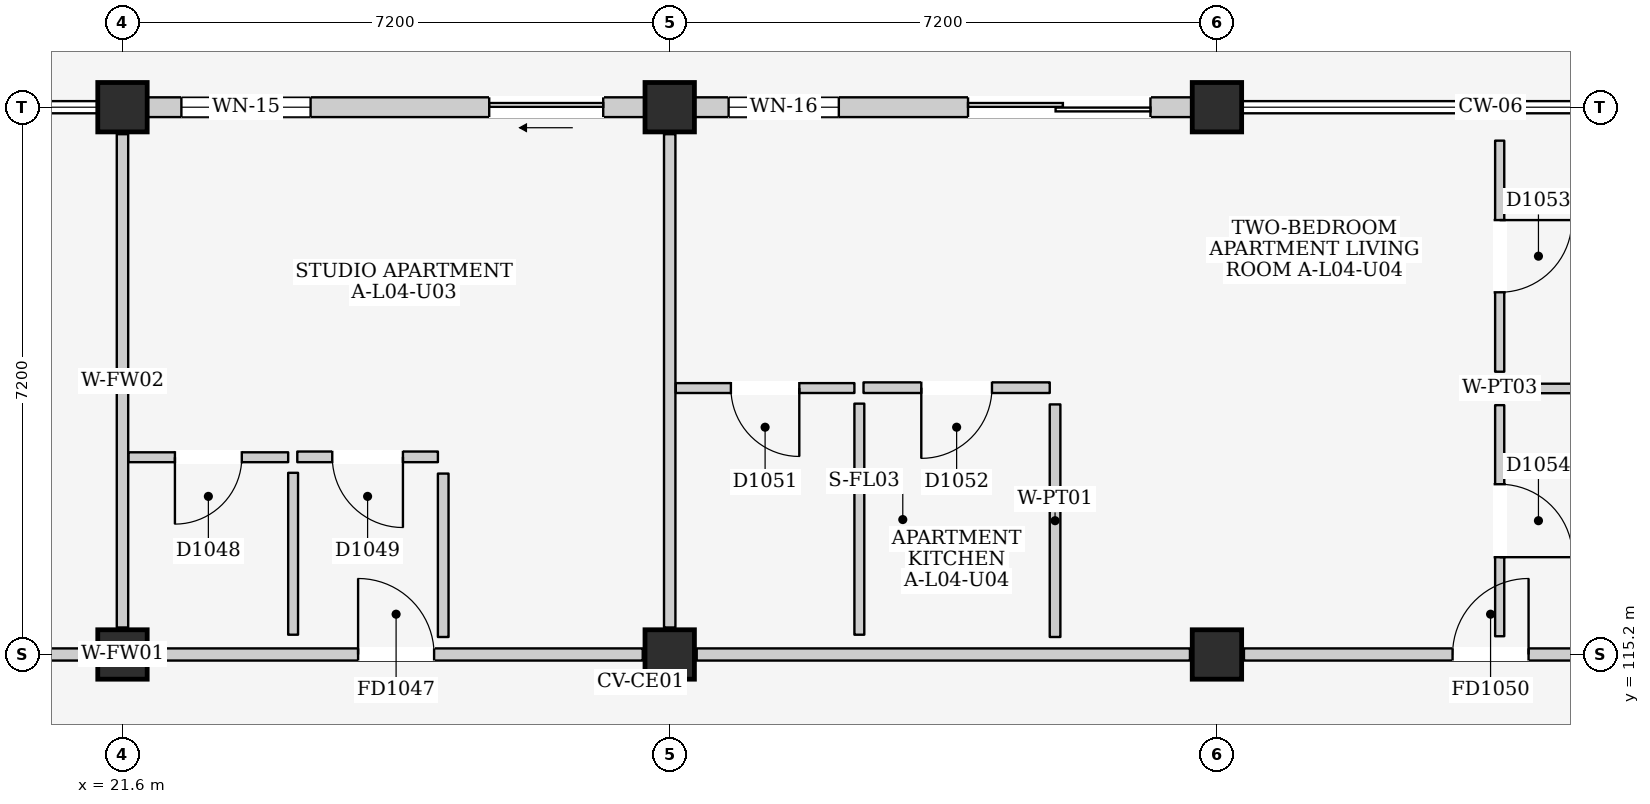
"""IFC4 building model, lengths in metres.
Left out: names, types, materials, properties, quantities, classifications, styles, units other than length and angle.
Written with IfcOpenShell. Run it as: python <this file> out.ifc"""

import sys

from ifc_helpers import new_model, si_unit, direction, frame, frame_2d, origin, origin_2d, place, context, subcontext, project, spatial, rectangle, extrude, element, fill, save


model = new_model("IFC4")
c1 = context("Model", 3, precision=1e-05, world=origin(), true_north=direction((0.0, 1.0)))
c2 = subcontext(c1, "Body", "Model", "MODEL_VIEW")
j1 = project(units=[si_unit("LENGTHUNIT", "METRE"), si_unit("PLANEANGLEUNIT", "RADIAN")], contexts=[c1])
p1 = place(None, origin())
s1 = spatial("IfcSite", under=j1, at=p1, CompositionType="ELEMENT")
p2 = place(p1, origin())
s2 = spatial("IfcBuilding", under=s1, at=p2, CompositionType="ELEMENT")
p3 = place(p2, frame((0.0, 0.0, 15.4)))
s3 = spatial("IfcBuildingStorey", under=s2, at=p3, CompositionType="ELEMENT", Elevation=15.4)
for number, where, z_axis, x_axis in (
    (1, (21.6, 115.2, 0.0), (0.0, 0.0, 1.0), (1.0, 0.0, 0.0)),
    (2, (21.6, 122.4, 0.0), (0.0, 0.0, 1.0), (1.0, 0.0, 0.0)),
    (3, (28.8, 115.2, 0.0), (0.0, 0.0, 1.0), (1.0, 0.0, 0.0)),
    (4, (28.8, 122.4, 0.0), (0.0, 0.0, 1.0), (1.0, 0.0, 0.0)),
    (5, (36.0, 115.2, 0.0), (0.0, 0.0, 1.0), (1.0, 0.0, 0.0)),
    (6, (36.0, 122.4, 0.0), (0.0, 0.0, 1.0), (1.0, 0.0, 0.0)),
):
    element("IfcColumn", number, at=place(p3, frame(where, z_axis=z_axis, x_axis=x_axis)), inside=s3, PredefinedType="COLUMN", context=c2, shape_type="SweptSolid", body=[
        extrude(rectangle(XDim=0.65, YDim=0.65, at=origin_2d()), origin(), (0.0, 0.0, 1.0), 3.2),
    ])
p4 = place(p3, frame((21.925, 122.4, 0.0), z_axis=(0.0, 0.0, 1.0), x_axis=(1.0, 0.0, 0.0)))
e7 = element("IfcWall", 7, at=p4, inside=s3, PredefinedType="ELEMENTEDWALL", context=c2, shape_type="SweptSolid", body=[
    extrude(rectangle(XDim=6.55, YDim=0.26, at=frame_2d((3.275, 0.0))), origin(), (0.0, 0.0, 1.0), 2.43),
])
p5 = place(p4, frame((4.5, 0.0, 0.0)))
e8 = element("IfcOpeningElement", 8, at=p5, cuts=e7, PredefinedType="OPENING", context=c2, shape_type="SweptSolid", body=[
    extrude(rectangle(XDim=1.5, YDim=2.12, at=frame_2d((0.75, 1.06))), frame((0.0, 0.145, 0.0), z_axis=(0.0, -1.0, 0.0), x_axis=(1.0, 0.0, 0.0)), (0.0, 0.0, 1.0), 0.29),
])
p6 = place(p4, frame((0.45, 0.0, 0.86)))
e9 = element("IfcOpeningElement", 9, at=p6, cuts=e7, PredefinedType="OPENING", context=c2, shape_type="SweptSolid", body=[
    extrude(rectangle(XDim=1.7, YDim=1.45, at=frame_2d((0.85, 0.725))), frame((0.0, 0.145, 0.0), z_axis=(0.0, -1.0, 0.0), x_axis=(1.0, 0.0, 0.0)), (0.0, 0.0, 1.0), 0.29),
])
p7 = place(p3, frame((29.125, 122.4, 0.0), z_axis=(0.0, 0.0, 1.0), x_axis=(1.0, 0.0, 0.0)))
e10 = element("IfcWall", 10, at=p7, inside=s3, PredefinedType="ELEMENTEDWALL", context=c2, shape_type="SweptSolid", body=[
    extrude(rectangle(XDim=6.55, YDim=0.26, at=frame_2d((3.275, 0.0))), origin(), (0.0, 0.0, 1.0), 2.43),
])
p8 = place(p7, frame((3.6, 0.0, 0.0)))
e11 = element("IfcOpeningElement", 11, at=p8, cuts=e10, PredefinedType="OPENING", context=c2, shape_type="SweptSolid", body=[
    extrude(rectangle(XDim=2.4, YDim=2.12, at=frame_2d((1.2, 1.06))), frame((0.0, 0.145, 0.0), z_axis=(0.0, -1.0, 0.0), x_axis=(1.0, 0.0, 0.0)), (0.0, 0.0, 1.0), 0.29),
])
p9 = place(p7, frame((0.45, 0.0, 0.9)))
e12 = element("IfcOpeningElement", 12, at=p9, cuts=e10, PredefinedType="OPENING", context=c2, shape_type="SweptSolid", body=[
    extrude(rectangle(XDim=1.45, YDim=1.4, at=frame_2d((0.725, 0.7))), frame((0.0, 0.145, 0.0), z_axis=(0.0, -1.0, 0.0), x_axis=(1.0, 0.0, 0.0)), (0.0, 0.0, 1.0), 0.29),
])
p10 = place(p3, frame((14.755, 115.2, 0.0), z_axis=(0.0, 0.0, 1.0), x_axis=(1.0, 0.0, 0.0)))
e13 = element("IfcWall", 13, at=p10, inside=s3, PredefinedType="PARTITIONING", context=c2, shape_type="SweptSolid", body=[
    extrude(rectangle(XDim=6.49, YDim=0.16, at=frame_2d((3.245, 0.0))), origin(), (0.0, 0.0, 1.0), 2.285),
])
p11 = place(p10, frame((2.72, 0.0, 0.0)))
e14 = element("IfcOpeningElement", 14, at=p11, cuts=e13, PredefinedType="OPENING", context=c2, shape_type="SweptSolid", body=[
    extrude(rectangle(XDim=1.05, YDim=2.15, at=frame_2d((0.525, 1.075))), frame((0.0, 0.095, 0.0), z_axis=(0.0, -1.0, 0.0), x_axis=(1.0, 0.0, 0.0)), (0.0, 0.0, 1.0), 0.19),
])
p12 = place(p3, frame((21.6, 115.555, 0.0), z_axis=(0.0, 0.0, 1.0), x_axis=(0.0, 1.0, 0.0)))
e15 = element("IfcWall", 15, at=p12, inside=s3, PredefinedType="PARTITIONING", context=c2, shape_type="SweptSolid", body=[
    extrude(rectangle(XDim=6.49, YDim=0.15, at=frame_2d((3.245, 0.0))), origin(), (0.0, 0.0, 1.0), 2.385),
])
p13 = place(p3, frame((21.955, 115.2, 0.0), z_axis=(0.0, 0.0, 1.0), x_axis=(1.0, 0.0, 0.0)))
e16 = element("IfcWall", 16, at=p13, inside=s3, PredefinedType="PARTITIONING", context=c2, shape_type="SweptSolid", body=[
    extrude(rectangle(XDim=6.49, YDim=0.16, at=frame_2d((3.245, 0.0))), origin(), (0.0, 0.0, 1.0), 2.285),
])
p14 = place(p13, frame((2.745, 0.0, 0.0)))
e17 = element("IfcOpeningElement", 17, at=p14, cuts=e16, PredefinedType="OPENING", context=c2, shape_type="SweptSolid", body=[
    extrude(rectangle(XDim=1.0, YDim=2.15, at=frame_2d((0.5, 1.075))), frame((0.0, 0.095, 0.0), z_axis=(0.0, -1.0, 0.0), x_axis=(1.0, 0.0, 0.0)), (0.0, 0.0, 1.0), 0.19),
])
p15 = place(p3, frame((28.8, 115.555, 0.0), z_axis=(0.0, 0.0, 1.0), x_axis=(0.0, 1.0, 0.0)))
e18 = element("IfcWall", 18, at=p15, inside=s3, PredefinedType="PARTITIONING", context=c2, shape_type="SweptSolid", body=[
    extrude(rectangle(XDim=6.49, YDim=0.15, at=frame_2d((3.245, 0.0))), origin(), (0.0, 0.0, 1.0), 2.385),
])
p16 = place(p3, frame((21.68, 117.795, 0.0), z_axis=(0.0, 0.0, 1.0), x_axis=(1.0, 0.0, 0.0)))
e19 = element("IfcWall", 19, at=p16, inside=s3, PredefinedType="PARTITIONING", context=c2, shape_type="SweptSolid", body=[
    extrude(rectangle(XDim=2.1, YDim=0.13, at=frame_2d((1.05, 0.0))), origin(), (0.0, 0.0, 1.0), 2.95),
])
p17 = place(p16, frame((0.61, 0.0, 0.0)))
e20 = element("IfcOpeningElement", 20, at=p17, cuts=e19, PredefinedType="OPENING", context=c2, shape_type="SweptSolid", body=[
    extrude(rectangle(XDim=0.88, YDim=2.1, at=frame_2d((0.44, 1.05))), frame((0.0, 0.08, 0.0), z_axis=(0.0, -1.0, 0.0), x_axis=(1.0, 0.0, 0.0)), (0.0, 0.0, 1.0), 0.16),
])
p18 = place(p3, frame((23.845, 115.46, 0.0), z_axis=(0.0, 0.0, 1.0), x_axis=(0.0, 1.0, 0.0)))
e21 = element("IfcWall", 21, at=p18, inside=s3, PredefinedType="PARTITIONING", context=c2, shape_type="SweptSolid", body=[
    extrude(rectangle(XDim=2.13, YDim=0.13, at=frame_2d((1.065, 0.0))), origin(), (0.0, 0.0, 1.0), 2.95),
])
p19 = place(p3, frame((23.9, 117.8, 0.0), z_axis=(0.0, 0.0, 1.0), x_axis=(1.0, 0.0, 0.0)))
e22 = element("IfcWall", 22, at=p19, inside=s3, PredefinedType="PARTITIONING", context=c2, shape_type="SweptSolid", body=[
    extrude(rectangle(XDim=1.85, YDim=0.14, at=frame_2d((0.925, 0.0))), origin(), (0.0, 0.0, 1.0), 2.95),
])
p20 = place(p19, frame((0.46, 0.0, 0.0)))
e23 = element("IfcOpeningElement", 23, at=p20, cuts=e22, PredefinedType="OPENING", context=c2, shape_type="SweptSolid", body=[
    extrude(rectangle(XDim=0.93, YDim=2.14, at=frame_2d((0.465, 1.07))), frame((0.0, 0.085, 0.0), z_axis=(0.0, -1.0, 0.0), x_axis=(1.0, 0.0, 0.0)), (0.0, 0.0, 1.0), 0.17),
])
p21 = place(p3, frame((25.82, 115.43, 0.0), z_axis=(0.0, 0.0, 1.0), x_axis=(0.0, 1.0, 0.0)))
e24 = element("IfcWall", 24, at=p21, inside=s3, PredefinedType="PARTITIONING", context=c2, shape_type="SweptSolid", body=[
    extrude(rectangle(XDim=2.15, YDim=0.14, at=frame_2d((1.075, 0.0))), origin(), (0.0, 0.0, 1.0), 2.95),
])
p22 = place(p3, frame((29.155, 115.2, 0.0), z_axis=(0.0, 0.0, 1.0), x_axis=(1.0, 0.0, 0.0)))
e25 = element("IfcWall", 25, at=p22, inside=s3, PredefinedType="PARTITIONING", context=c2, shape_type="SweptSolid", body=[
    extrude(rectangle(XDim=6.49, YDim=0.16, at=frame_2d((3.245, 0.0))), origin(), (0.0, 0.0, 1.0), 2.285),
])
p23 = place(p3, frame((36.355, 115.2, 0.0), z_axis=(0.0, 0.0, 1.0), x_axis=(1.0, 0.0, 0.0)))
e26 = element("IfcWall", 26, at=p23, inside=s3, PredefinedType="PARTITIONING", context=c2, shape_type="SweptSolid", body=[
    extrude(rectangle(XDim=6.49, YDim=0.16, at=frame_2d((3.245, 0.0))), origin(), (0.0, 0.0, 1.0), 2.285),
])
p24 = place(p23, frame((2.745, 0.0, 0.0)))
e27 = element("IfcOpeningElement", 27, at=p24, cuts=e26, PredefinedType="OPENING", context=c2, shape_type="SweptSolid", body=[
    extrude(rectangle(XDim=1.0, YDim=2.15, at=frame_2d((0.5, 1.075))), frame((0.0, 0.095, 0.0), z_axis=(0.0, -1.0, 0.0), x_axis=(1.0, 0.0, 0.0)), (0.0, 0.0, 1.0), 0.19),
])
p25 = place(p3, frame((28.88, 118.705, 0.0), z_axis=(0.0, 0.0, 1.0), x_axis=(1.0, 0.0, 0.0)))
e28 = element("IfcWall", 28, at=p25, inside=s3, PredefinedType="PARTITIONING", context=c2, shape_type="SweptSolid", body=[
    extrude(rectangle(XDim=2.35, YDim=0.13, at=frame_2d((1.175, 0.0))), origin(), (0.0, 0.0, 1.0), 2.95),
])
p26 = place(p25, frame((0.725, 0.0, 0.0)))
e29 = element("IfcOpeningElement", 29, at=p26, cuts=e28, PredefinedType="OPENING", context=c2, shape_type="SweptSolid", body=[
    extrude(rectangle(XDim=0.9, YDim=2.1, at=frame_2d((0.45, 1.05))), frame((0.0, 0.08, 0.0), z_axis=(0.0, -1.0, 0.0), x_axis=(1.0, 0.0, 0.0)), (0.0, 0.0, 1.0), 0.16),
])
p27 = place(p3, frame((31.295, 115.46, 0.0), z_axis=(0.0, 0.0, 1.0), x_axis=(0.0, 1.0, 0.0)))
e30 = element("IfcWall", 30, at=p27, inside=s3, PredefinedType="PARTITIONING", context=c2, shape_type="SweptSolid", body=[
    extrude(rectangle(XDim=3.04, YDim=0.13, at=frame_2d((1.52, 0.0))), origin(), (0.0, 0.0, 1.0), 2.95),
])
p28 = place(p3, frame((31.35, 118.71, 0.0), z_axis=(0.0, 0.0, 1.0), x_axis=(1.0, 0.0, 0.0)))
e31 = element("IfcWall", 31, at=p28, inside=s3, PredefinedType="PARTITIONING", context=c2, shape_type="SweptSolid", body=[
    extrude(rectangle(XDim=2.45, YDim=0.14, at=frame_2d((1.225, 0.0))), origin(), (0.0, 0.0, 1.0), 2.95),
])
p29 = place(p28, frame((0.76, 0.0, 0.0)))
e32 = element("IfcOpeningElement", 32, at=p29, cuts=e31, PredefinedType="OPENING", context=c2, shape_type="SweptSolid", body=[
    extrude(rectangle(XDim=0.93, YDim=2.14, at=frame_2d((0.465, 1.07))), frame((0.0, 0.085, 0.0), z_axis=(0.0, -1.0, 0.0), x_axis=(1.0, 0.0, 0.0)), (0.0, 0.0, 1.0), 0.17),
])
p30 = place(p3, frame((33.87, 115.43, 0.0), z_axis=(0.0, 0.0, 1.0), x_axis=(0.0, 1.0, 0.0)))
e33 = element("IfcWall", 33, at=p30, inside=s3, PredefinedType="PARTITIONING", context=c2, shape_type="SweptSolid", body=[
    extrude(rectangle(XDim=3.06, YDim=0.14, at=frame_2d((1.53, 0.0))), origin(), (0.0, 0.0, 1.0), 2.95),
])
p31 = place(p3, frame((39.72, 118.92, 0.0), z_axis=(0.0, 0.0, 1.0), x_axis=(0.0, 1.0, 0.0)))
e34 = element("IfcWall", 34, at=p31, inside=s3, PredefinedType="PARTITIONING", context=c2, shape_type="SweptSolid", body=[
    extrude(rectangle(XDim=3.04, YDim=0.12, at=frame_2d((1.52, 0.0))), origin(), (0.0, 0.0, 1.0), 2.95),
])
p32 = place(p31, frame((1.045, 0.0, 0.0)))
e35 = element("IfcOpeningElement", 35, at=p32, cuts=e34, PredefinedType="OPENING", context=c2, shape_type="SweptSolid", body=[
    extrude(rectangle(XDim=0.95, YDim=2.15, at=frame_2d((0.475, 1.075))), frame((0.0, 0.075, 0.0), z_axis=(0.0, -1.0, 0.0), x_axis=(1.0, 0.0, 0.0)), (0.0, 0.0, 1.0), 0.15),
])
p33 = place(p3, frame((39.92, 118.7, 0.0), z_axis=(0.0, 0.0, 1.0), x_axis=(1.0, 0.0, 0.0)))
e36 = element("IfcWall", 36, at=p33, inside=s3, PredefinedType="PARTITIONING", context=c2, shape_type="SweptSolid", body=[
    extrude(rectangle(XDim=3.06, YDim=0.125, at=frame_2d((1.53, 0.0))), origin(), (0.0, 0.0, 1.0), 2.95),
])
p34 = place(p3, frame((39.72, 115.44, 0.0), z_axis=(0.0, 0.0, 1.0), x_axis=(0.0, 1.0, 0.0)))
e37 = element("IfcWall", 37, at=p34, inside=s3, PredefinedType="PARTITIONING", context=c2, shape_type="SweptSolid", body=[
    extrude(rectangle(XDim=3.04, YDim=0.12, at=frame_2d((1.52, 0.0))), origin(), (0.0, 0.0, 1.0), 2.95),
])
p35 = place(p34, frame((1.04, 0.0, 0.0)))
e38 = element("IfcOpeningElement", 38, at=p35, cuts=e37, PredefinedType="OPENING", context=c2, shape_type="SweptSolid", body=[
    extrude(rectangle(XDim=0.96, YDim=2.15, at=frame_2d((0.48, 1.075))), frame((0.0, 0.075, 0.0), z_axis=(0.0, -1.0, 0.0), x_axis=(1.0, 0.0, 0.0)), (0.0, 0.0, 1.0), 0.15),
])
p36 = place(p5, frame((1.5, 0.0, 0.0), z_axis=(0.0, 0.0, 1.0), x_axis=(-1.0, 0.0, 0.0)))
e39 = element("IfcDoor", 39, at=p36, inside=s3, OperationType="SLIDING_TO_LEFT", PredefinedType="DOOR", context=c2, shape_type="SweptSolid", body=[
    extrude(rectangle(XDim=1.5, YDim=2.12, at=frame_2d((0.75, 1.06))), frame((0.0, 0.025, 0.0), z_axis=(0.0, -1.0, 0.0), x_axis=(1.0, 0.0, 0.0)), (0.0, 0.0, 1.0), 0.05),
])
fill(e8, e39)
p37 = place(p6, origin())
e40 = element("IfcWindow", 40, at=p37, inside=s3, PartitioningType="DOUBLE_PANEL_VERTICAL", PredefinedType="WINDOW", context=c2, shape_type="SweptSolid", body=[
    extrude(rectangle(XDim=1.7, YDim=1.45, at=frame_2d((0.85, 0.725))), frame((0.0, 0.03, 0.0), z_axis=(0.0, -1.0, 0.0), x_axis=(1.0, 0.0, 0.0)), (0.0, 0.0, 1.0), 0.06),
])
fill(e9, e40)
p38 = place(p8, frame((2.4, 0.0, 0.0), z_axis=(0.0, 0.0, 1.0), x_axis=(-1.0, 0.0, 0.0)))
e41 = element("IfcDoor", 41, at=p38, inside=s3, OperationType="DOUBLE_DOOR_SLIDING", PredefinedType="DOOR", context=c2, shape_type="SweptSolid", body=[
    extrude(rectangle(XDim=2.4, YDim=2.12, at=frame_2d((1.2, 1.06))), frame((0.0, 0.025, 0.0), z_axis=(0.0, -1.0, 0.0), x_axis=(1.0, 0.0, 0.0)), (0.0, 0.0, 1.0), 0.05),
])
fill(e11, e41)
p39 = place(p9, origin())
e42 = element("IfcWindow", 42, at=p39, inside=s3, PartitioningType="DOUBLE_PANEL_VERTICAL", PredefinedType="WINDOW", context=c2, shape_type="SweptSolid", body=[
    extrude(rectangle(XDim=1.45, YDim=1.4, at=frame_2d((0.725, 0.7))), frame((0.0, 0.03, 0.0), z_axis=(0.0, -1.0, 0.0), x_axis=(1.0, 0.0, 0.0)), (0.0, 0.0, 1.0), 0.06),
])
fill(e12, e42)
p40 = place(p14, origin())
e43 = element("IfcDoor", 43, at=p40, inside=s3, OperationType="SINGLE_SWING_LEFT", PredefinedType="DOOR", context=c2, shape_type="SweptSolid", body=[
    extrude(rectangle(XDim=1.0, YDim=2.15, at=frame_2d((0.5, 1.075))), frame((0.0, 0.025, 0.0), z_axis=(0.0, -1.0, 0.0), x_axis=(1.0, 0.0, 0.0)), (0.0, 0.0, 1.0), 0.05),
])
fill(e17, e43)
p41 = place(p17, frame((0.88, 0.0, 0.0), z_axis=(0.0, 0.0, 1.0), x_axis=(-1.0, 0.0, 0.0)))
e44 = element("IfcDoor", 44, at=p41, inside=s3, OperationType="SINGLE_SWING_RIGHT", PredefinedType="DOOR", context=c2, shape_type="SweptSolid", body=[
    extrude(rectangle(XDim=0.88, YDim=2.1, at=frame_2d((0.44, 1.05))), frame((0.0, 0.025, 0.0), z_axis=(0.0, -1.0, 0.0), x_axis=(1.0, 0.0, 0.0)), (0.0, 0.0, 1.0), 0.05),
])
fill(e20, e44)
p42 = place(p20, frame((0.93, 0.0, 0.0), z_axis=(0.0, 0.0, 1.0), x_axis=(-1.0, 0.0, 0.0)))
e45 = element("IfcDoor", 45, at=p42, inside=s3, OperationType="SINGLE_SWING_LEFT", PredefinedType="DOOR", context=c2, shape_type="SweptSolid", body=[
    extrude(rectangle(XDim=0.93, YDim=2.14, at=frame_2d((0.465, 1.07))), frame((0.0, 0.025, 0.0), z_axis=(0.0, -1.0, 0.0), x_axis=(1.0, 0.0, 0.0)), (0.0, 0.0, 1.0), 0.05),
])
fill(e23, e45)
p43 = place(p24, origin())
e46 = element("IfcDoor", 46, at=p43, inside=s3, OperationType="SINGLE_SWING_RIGHT", PredefinedType="DOOR", context=c2, shape_type="SweptSolid", body=[
    extrude(rectangle(XDim=1.0, YDim=2.15, at=frame_2d((0.5, 1.075))), frame((0.0, 0.025, 0.0), z_axis=(0.0, -1.0, 0.0), x_axis=(1.0, 0.0, 0.0)), (0.0, 0.0, 1.0), 0.05),
])
fill(e27, e46)
p44 = place(p26, frame((0.9, 0.0, 0.0), z_axis=(0.0, 0.0, 1.0), x_axis=(-1.0, 0.0, 0.0)))
e47 = element("IfcDoor", 47, at=p44, inside=s3, OperationType="SINGLE_SWING_LEFT", PredefinedType="DOOR", context=c2, shape_type="SweptSolid", body=[
    extrude(rectangle(XDim=0.9, YDim=2.1, at=frame_2d((0.45, 1.05))), frame((0.0, 0.025, 0.0), z_axis=(0.0, -1.0, 0.0), x_axis=(1.0, 0.0, 0.0)), (0.0, 0.0, 1.0), 0.05),
])
fill(e29, e47)
p45 = place(p29, frame((0.93, 0.0, 0.0), z_axis=(0.0, 0.0, 1.0), x_axis=(-1.0, 0.0, 0.0)))
e48 = element("IfcDoor", 48, at=p45, inside=s3, OperationType="SINGLE_SWING_RIGHT", PredefinedType="DOOR", context=c2, shape_type="SweptSolid", body=[
    extrude(rectangle(XDim=0.93, YDim=2.14, at=frame_2d((0.465, 1.07))), frame((0.0, 0.025, 0.0), z_axis=(0.0, -1.0, 0.0), x_axis=(1.0, 0.0, 0.0)), (0.0, 0.0, 1.0), 0.05),
])
fill(e32, e48)
p46 = place(p32, frame((0.95, 0.0, 0.0), z_axis=(0.0, 0.0, 1.0), x_axis=(-1.0, 0.0, 0.0)))
e49 = element("IfcDoor", 49, at=p46, inside=s3, OperationType="SINGLE_SWING_LEFT", PredefinedType="DOOR", context=c2, shape_type="SweptSolid", body=[
    extrude(rectangle(XDim=0.95, YDim=2.15, at=frame_2d((0.475, 1.075))), frame((0.0, 0.025, 0.0), z_axis=(0.0, -1.0, 0.0), x_axis=(1.0, 0.0, 0.0)), (0.0, 0.0, 1.0), 0.05),
])
fill(e35, e49)
p47 = place(p35, frame((0.96, 0.0, 0.0), z_axis=(0.0, 0.0, 1.0), x_axis=(-1.0, 0.0, 0.0)))
e50 = element("IfcDoor", 50, at=p47, inside=s3, OperationType="SINGLE_SWING_RIGHT", PredefinedType="DOOR", context=c2, shape_type="SweptSolid", body=[
    extrude(rectangle(XDim=0.96, YDim=2.15, at=frame_2d((0.48, 1.075))), frame((0.0, 0.025, 0.0), z_axis=(0.0, -1.0, 0.0), x_axis=(1.0, 0.0, 0.0)), (0.0, 0.0, 1.0), 0.05),
])
fill(e38, e50)
save(model, sys.argv[1])
